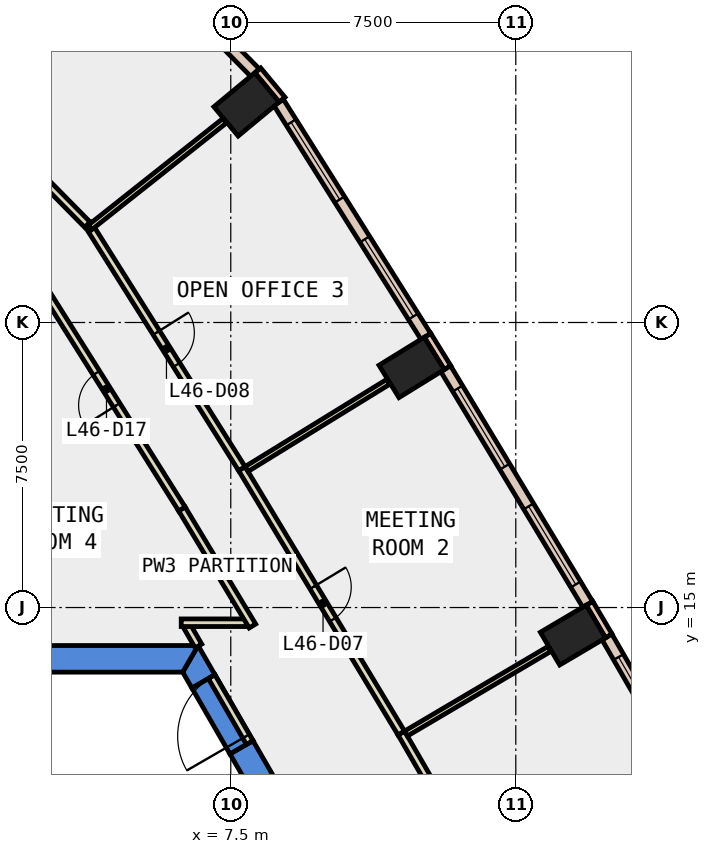
"""IFC4 building model, lengths in metres.
Left out: names, types, materials, properties, quantities, classifications, styles, units other than length and angle.
Written with IfcOpenShell. Run it as: python <this file> out.ifc"""

import sys

from ifc_helpers import new_model, si_unit, direction, frame, frame_2d, origin, origin_2d, place, context, subcontext, project, spatial, polyline, rectangle, outline, extrude, element, fill, save


model = new_model("IFC4")
c1 = context("Model", 3, precision=1e-05, world=origin(), true_north=direction((0.0, 1.0)))
c2 = subcontext(c1, "Body", "Model", "MODEL_VIEW")
j1 = project(units=[si_unit("LENGTHUNIT", "METRE"), si_unit("PLANEANGLEUNIT", "RADIAN")], contexts=[c1])
p1 = place(None, origin())
s1 = spatial("IfcSite", under=j1, at=p1, CompositionType="ELEMENT")
p2 = place(p1, origin())
s2 = spatial("IfcBuilding", under=s1, at=p2, CompositionType="ELEMENT")
p3 = place(p2, frame((0.0, 0.0, 206.6)))
s3 = spatial("IfcBuildingStorey", under=s2, at=p3, CompositionType="ELEMENT", Elevation=206.6)
for number, where, z_axis, x_axis in (
    (1, (16.504, 14.275, -0.4), (0.0, 0.0, 1.0), (-0.509, 0.861, 0.0)),
    (2, (12.259, 21.317, -0.4), (0.0, 0.0, 1.0), (-0.525, 0.851, 0.0)),
    (3, (7.914, 28.238, -0.4), (0.0, 0.0, 1.0), (-0.639, 0.769, 0.0)),
):
    element("IfcColumn", number, at=place(p3, frame(where, z_axis=z_axis, x_axis=x_axis)), inside=s3, PredefinedType="COLUMN", context=c2, shape_type="SweptSolid", body=[
        extrude(rectangle(XDim=1.0, YDim=1.4, at=origin_2d()), origin(), (0.0, 0.0, 1.0), 4.2),
    ])
p4 = place(p3, frame((0.0, 0.0, -0.4)))
e4 = element("IfcWall", 4, at=p4, inside=s3, PredefinedType="SHEAR", context=c2, shape_type="SweptSolid", body=[
    extrude(outline(polyline([(8.084, 11.498), (7.478, 11.148), (12.471, 2.5), (13.279, 2.5), (8.084, 11.498)])), origin(), (0.0, 0.0, 1.0), 4.2),
])
p5 = place(p3, frame((0.0, 0.0, -0.4)))
e5 = element("IfcWall", 5, at=p5, inside=s3, PredefinedType="SHEAR", context=c2, shape_type="SweptSolid", body=[
    extrude(outline(polyline([(6.478, 12.88), (7.084, 13.23), (6.64, 14.0), (6.235, 13.3), (6.478, 12.88)])), origin(), (0.0, 0.0, 1.0), 4.2),
])
p6 = place(p3, frame((0.0, 0.0, 3.6)))
e6 = element("IfcWall", 6, at=p6, inside=s3, PredefinedType="SHEAR", context=c2, shape_type="SweptSolid", body=[
    extrude(outline(polyline([(7.084, 13.23), (6.478, 12.88), (7.478, 11.148), (8.084, 11.498), (7.084, 13.23)])), origin(), (0.0, 0.0, 1.0), 0.2),
])
p7 = place(p3, frame((0.0, 0.0, -0.4)))
e7 = element("IfcWall", 7, at=p7, inside=s3, PredefinedType="SHEAR", context=c2, shape_type="SweptSolid", body=[
    extrude(outline(polyline([(6.64, 14.0), (-6.64, 14.0), (-6.235, 13.3), (6.235, 13.3), (6.64, 14.0)])), origin(), (0.0, 0.0, 1.0), 4.2),
])
p8 = place(p3, frame((17.447, 14.252, 0.0), z_axis=(0.0, 0.0, 1.0), x_axis=(-0.508161541526, 0.861261776531, 0.0)))
e8 = element("IfcWall", 8, at=p8, inside=s3, PredefinedType="STANDARD", context=c2, shape_type="SweptSolid", body=[
    extrude(rectangle(XDim=1.0, YDim=0.2, at=frame_2d((0.5, 0.0))), origin(), (0.0, 0.0, 1.0), 3.8),
])
p9 = place(p3, frame((13.203, 21.312, 0.0), z_axis=(0.0, 0.0, 1.0), x_axis=(-0.525648735675, 0.850701714282, 0.0)))
e9 = element("IfcWall", 9, at=p9, inside=s3, PredefinedType="STANDARD", context=c2, shape_type="SweptSolid", body=[
    extrude(rectangle(XDim=1.0, YDim=0.2, at=frame_2d((0.5, 0.0))), origin(), (0.0, 0.0, 1.0), 3.8),
])
p10 = place(p3, frame((8.849, 28.364, 0.0), z_axis=(0.0, 0.0, 1.0), x_axis=(-0.638117112481, 0.769939316283, 0.0)))
e10 = element("IfcWall", 10, at=p10, inside=s3, PredefinedType="STANDARD", context=c2, shape_type="SweptSolid", body=[
    extrude(rectangle(XDim=1.0, YDim=0.2, at=frame_2d((0.5, 0.0))), origin(), (0.0, 0.0, 1.0), 3.8),
])
p11 = place(p3, frame((21.019, 7.955, 0.0), z_axis=(0.0, 0.0, 1.0), x_axis=(-0.500012402131, 0.866018243292, 0.0)))
e11 = element("IfcWall", 11, at=p11, inside=s3, PredefinedType="STANDARD", context=c2, shape_type="SweptSolid", body=[
    extrude(rectangle(XDim=7.24, YDim=0.3, at=frame_2d((3.62, 0.0))), origin(), (0.0, 0.0, 1.0), 3.8),
])
p12 = place(p11, frame((0.61, 0.0, 0.9)))
e12 = element("IfcOpeningElement", 12, at=p12, cuts=e11, PredefinedType="OPENING", context=c2, shape_type="SweptSolid", body=[
    extrude(rectangle(XDim=2.4, YDim=2.6, at=frame_2d((1.2, 1.3))), frame((0.0, 0.16, 0.0), z_axis=(0.0, -1.0, 0.0), x_axis=(1.0, 0.0, 0.0)), (0.0, 0.0, 1.0), 0.32),
])
p13 = place(p11, frame((4.23, 0.0, 0.9)))
e13 = element("IfcOpeningElement", 13, at=p13, cuts=e11, PredefinedType="OPENING", context=c2, shape_type="SweptSolid", body=[
    extrude(rectangle(XDim=2.4, YDim=2.6, at=frame_2d((1.2, 1.3))), frame((0.0, 0.16, 0.0), z_axis=(0.0, -1.0, 0.0), x_axis=(1.0, 0.0, 0.0)), (0.0, 0.0, 1.0), 0.32),
])
p14 = place(p3, frame((16.892, 15.084, 0.0), z_axis=(0.0, 0.0, 1.0), x_axis=(-0.516230553484, 0.856449657394, 0.0)))
e14 = element("IfcWall", 14, at=p14, inside=s3, PredefinedType="STANDARD", context=c2, shape_type="SweptSolid", body=[
    extrude(rectangle(XDim=7.239, YDim=0.3, at=frame_2d((3.62, 0.0))), origin(), (0.0, 0.0, 1.0), 3.8),
])
p15 = place(p14, frame((0.61, 0.0, 0.9)))
e15 = element("IfcOpeningElement", 15, at=p15, cuts=e14, PredefinedType="OPENING", context=c2, shape_type="SweptSolid", body=[
    extrude(rectangle(XDim=2.4, YDim=2.6, at=frame_2d((1.2, 1.3))), frame((0.0, 0.16, 0.0), z_axis=(0.0, -1.0, 0.0), x_axis=(1.0, 0.0, 0.0)), (0.0, 0.0, 1.0), 0.32),
])
p16 = place(p14, frame((4.229, 0.0, 0.9)))
e16 = element("IfcOpeningElement", 16, at=p16, cuts=e14, PredefinedType="OPENING", context=c2, shape_type="SweptSolid", body=[
    extrude(rectangle(XDim=2.4, YDim=2.6, at=frame_2d((1.2, 1.3))), frame((0.0, 0.16, 0.0), z_axis=(0.0, -1.0, 0.0), x_axis=(1.0, 0.0, 0.0)), (0.0, 0.0, 1.0), 0.32),
])
p17 = place(p3, frame((12.632, 22.134, 0.0), z_axis=(0.0, 0.0, 1.0), x_axis=(-0.532522107002, 0.84641609481, 0.0)))
e17 = element("IfcWall", 17, at=p17, inside=s3, PredefinedType="STANDARD", context=c2, shape_type="SweptSolid", body=[
    extrude(rectangle(XDim=7.273, YDim=0.3, at=frame_2d((3.636, 0.0))), origin(), (0.0, 0.0, 1.0), 3.8),
])
p18 = place(p17, frame((0.618, 0.0, 0.9)))
e18 = element("IfcOpeningElement", 18, at=p18, cuts=e17, PredefinedType="OPENING", context=c2, shape_type="SweptSolid", body=[
    extrude(rectangle(XDim=2.4, YDim=2.6, at=frame_2d((1.2, 1.3))), frame((0.0, 0.16, 0.0), z_axis=(0.0, -1.0, 0.0), x_axis=(1.0, 0.0, 0.0)), (0.0, 0.0, 1.0), 0.32),
])
p19 = place(p17, frame((4.255, 0.0, 0.9)))
e19 = element("IfcOpeningElement", 19, at=p19, cuts=e17, PredefinedType="OPENING", context=c2, shape_type="SweptSolid", body=[
    extrude(rectangle(XDim=2.4, YDim=2.6, at=frame_2d((1.2, 1.3))), frame((0.0, 0.16, 0.0), z_axis=(0.0, -1.0, 0.0), x_axis=(1.0, 0.0, 0.0)), (0.0, 0.0, 1.0), 0.32),
])
p20 = place(p3, frame((8.139, 29.073, 0.0), z_axis=(0.0, 0.0, 1.0), x_axis=(-0.70209072612, 0.712087503258, 0.0)))
e20 = element("IfcWall", 20, at=p20, inside=s3, PredefinedType="STANDARD", context=c2, shape_type="SweptSolid", body=[
    extrude(rectangle(XDim=4.005, YDim=0.3, at=frame_2d((2.002, 0.0))), origin(), (0.0, 0.0, 1.0), 3.8),
])
p21 = place(p20, frame((1.303, 0.0, 0.9)))
e21 = element("IfcOpeningElement", 21, at=p21, cuts=e20, PredefinedType="OPENING", context=c2, shape_type="SweptSolid", body=[
    extrude(rectangle(XDim=1.4, YDim=2.6, at=frame_2d((0.7, 1.3))), frame((0.0, 0.16, 0.0), z_axis=(0.0, -1.0, 0.0), x_axis=(1.0, 0.0, 0.0)), (0.0, 0.0, 1.0), 0.32),
])
p22 = place(p3, frame((6.649, 13.988, 0.0), z_axis=(0.0, 0.0, 1.0), x_axis=(-0.499908430952, 0.866078264744, 0.0)))
e22 = element("IfcWall", 22, at=p22, inside=s3, PredefinedType="PARTITIONING", context=c2, shape_type="SweptSolid", body=[
    extrude(rectangle(XDim=0.606, YDim=0.2, at=frame_2d((0.303, 0.0))), origin(), (0.0, 0.0, 1.0), 3.8),
])
p23 = place(p3, frame((6.196, 14.6, 0.0), z_axis=(0.0, 0.0, 1.0), x_axis=(1.0, 0.0, 0.0)))
e23 = element("IfcWall", 23, at=p23, inside=s3, PredefinedType="PARTITIONING", context=c2, shape_type="SweptSolid", body=[
    extrude(rectangle(XDim=1.722, YDim=0.2, at=frame_2d((0.861, 0.0))), origin(), (0.0, 0.0, 1.0), 3.8),
])
p24 = place(p3, frame((8.07, 14.514, 0.0), z_axis=(0.0, 0.0, 1.0), x_axis=(-0.51624118739, 0.856443247648, 0.0)))
e24 = element("IfcWall", 24, at=p24, inside=s3, PredefinedType="PARTITIONING", context=c2, shape_type="SweptSolid", body=[
    extrude(rectangle(XDim=3.597, YDim=0.2, at=frame_2d((1.799, 0.0))), origin(), (0.0, 0.0, 1.0), 3.8),
])
p25 = place(p3, frame((6.213, 17.595, 0.0), z_axis=(0.0, 0.0, 1.0), x_axis=(-0.532527247309, 0.846412860768, 0.0)))
e25 = element("IfcWall", 25, at=p25, inside=s3, PredefinedType="PARTITIONING", context=c2, shape_type="SweptSolid", body=[
    extrude(rectangle(XDim=7.449, YDim=0.2, at=frame_2d((3.725, 0.0))), origin(), (0.0, 0.0, 1.0), 3.8),
])
p26 = place(p25, frame((3.225, 0.0, 0.0)))
e26 = element("IfcOpeningElement", 26, at=p26, cuts=e25, PredefinedType="OPENING", context=c2, shape_type="SweptSolid", body=[
    extrude(rectangle(XDim=1.0, YDim=2.1, at=frame_2d((0.5, 1.05))), frame((0.0, 0.11, 0.0), z_axis=(0.0, -1.0, 0.0), x_axis=(1.0, 0.0, 0.0)), (0.0, 0.0, 1.0), 0.22),
])
p27 = place(p3, frame((11.987, 11.698, 0.0), z_axis=(0.0, 0.0, 1.0), x_axis=(0.500075329254, -0.865981908051, 0.0)))
e27 = element("IfcWall", 27, at=p27, inside=s3, PredefinedType="PARTITIONING", context=c2, shape_type="SweptSolid", body=[
    extrude(rectangle(XDim=8.125, YDim=0.2, at=frame_2d((4.062, 0.0))), origin(), (0.0, 0.0, 1.0), 3.8),
])
p28 = place(p27, frame((3.637, 0.0, 0.0)))
e28 = element("IfcOpeningElement", 28, at=p28, cuts=e27, PredefinedType="OPENING", context=c2, shape_type="SweptSolid", body=[
    extrude(rectangle(XDim=1.0, YDim=2.1, at=frame_2d((0.5, 1.05))), frame((0.0, 0.11, 0.0), z_axis=(0.0, -1.0, 0.0), x_axis=(1.0, 0.0, 0.0)), (0.0, 0.0, 1.0), 0.22),
])
p29 = place(p3, frame((7.792, 18.655, 0.0), z_axis=(0.0, 0.0, 1.0), x_axis=(0.516293428925, -0.856411755669, 0.0)))
e29 = element("IfcWall", 29, at=p29, inside=s3, PredefinedType="PARTITIONING", context=c2, shape_type="SweptSolid", body=[
    extrude(rectangle(XDim=8.124, YDim=0.2, at=frame_2d((4.062, 0.0))), origin(), (0.0, 0.0, 1.0), 3.8),
])
p30 = place(p29, frame((3.637, 0.0, 0.0)))
e30 = element("IfcOpeningElement", 30, at=p30, cuts=e29, PredefinedType="OPENING", context=c2, shape_type="SweptSolid", body=[
    extrude(rectangle(XDim=1.0, YDim=2.1, at=frame_2d((0.5, 1.05))), frame((0.0, 0.11, 0.0), z_axis=(0.0, -1.0, 0.0), x_axis=(1.0, 0.0, 0.0)), (0.0, 0.0, 1.0), 0.22),
])
p31 = place(p3, frame((3.744, 25.087, 0.0), z_axis=(0.0, 0.0, 1.0), x_axis=(0.532569549341, -0.846386244639, 0.0)))
e31 = element("IfcWall", 31, at=p31, inside=s3, PredefinedType="PARTITIONING", context=c2, shape_type="SweptSolid", body=[
    extrude(rectangle(XDim=7.599, YDim=0.2, at=frame_2d((3.8, 0.0))), origin(), (0.0, 0.0, 1.0), 3.8),
])
p32 = place(p31, frame((3.375, 0.0, 0.0)))
e32 = element("IfcOpeningElement", 32, at=p32, cuts=e31, PredefinedType="OPENING", context=c2, shape_type="SweptSolid", body=[
    extrude(rectangle(XDim=1.0, YDim=2.1, at=frame_2d((0.5, 1.05))), frame((0.0, 0.11, 0.0), z_axis=(0.0, -1.0, 0.0), x_axis=(1.0, 0.0, 0.0)), (0.0, 0.0, 1.0), 0.22),
])
p33 = place(p3, frame((1.773, 27.056, 0.0), z_axis=(0.0, 0.0, 1.0), x_axis=(0.702089218366, -0.712088989842, 0.0)))
e33 = element("IfcWall", 33, at=p33, inside=s3, PredefinedType="PARTITIONING", context=c2, shape_type="SweptSolid", body=[
    extrude(rectangle(XDim=2.783, YDim=0.2, at=frame_2d((1.392, 0.0))), origin(), (0.0, 0.0, 1.0), 3.8),
])
p34 = place(p3, frame((12.111, 11.684, 0.0), z_axis=(0.0, 0.0, 1.0), x_axis=(0.861290233547, 0.508113307833, 0.0)))
e34 = element("IfcWall", 34, at=p34, inside=s3, PredefinedType="PARTITIONING", context=c2, shape_type="SweptSolid", body=[
    extrude(rectangle(XDim=4.381, YDim=0.15, at=frame_2d((2.19, 0.0))), origin(), (0.0, 0.0, 1.0), 3.8),
])
p35 = place(p3, frame((7.916, 18.644, 0.0), z_axis=(0.0, 0.0, 1.0), x_axis=(0.851543444049, 0.524284047914, 0.0)))
e35 = element("IfcWall", 35, at=p35, inside=s3, PredefinedType="PARTITIONING", context=c2, shape_type="SweptSolid", body=[
    extrude(rectangle(XDim=4.379, YDim=0.15, at=frame_2d((2.189, 0.0))), origin(), (0.0, 0.0, 1.0), 3.8),
])
p36 = place(p3, frame((3.797, 25.003, 0.0), z_axis=(0.0, 0.0, 1.0), x_axis=(0.783893371826, 0.620895467536, 0.0)))
e36 = element("IfcWall", 36, at=p36, inside=s3, PredefinedType="PARTITIONING", context=c2, shape_type="SweptSolid", body=[
    extrude(rectangle(XDim=4.514, YDim=0.15, at=frame_2d((2.257, 0.0))), origin(), (0.0, 0.0, 1.0), 3.8),
])
p37 = place(p3, frame((7.997, 11.448, 0.0), z_axis=(0.0, 0.0, 1.0), x_axis=(-0.50002537861, 0.866010750942, 0.0)))
e37 = element("IfcWall", 37, at=p37, inside=s3, PredefinedType="PARTITIONING", context=c2, shape_type="SweptSolid", body=[
    extrude(rectangle(XDim=2.0, YDim=0.2, at=frame_2d((1.0, 0.0))), origin(), (0.0, 0.0, 1.0), 2.4),
])
p38 = place(p37, frame((0.19, 0.0, 0.0)))
e38 = element("IfcOpeningElement", 38, at=p38, cuts=e37, PredefinedType="OPENING", context=c2, shape_type="SweptSolid", body=[
    extrude(rectangle(XDim=1.8, YDim=2.1, at=frame_2d((0.9, 1.05))), frame((0.0, 0.11, 0.0), z_axis=(0.0, -1.0, 0.0), x_axis=(1.0, 0.0, 0.0)), (0.0, 0.0, 1.0), 0.22),
])
p39 = place(p13, origin())
e39 = element("IfcWindow", 39, at=p39, inside=s3, PartitioningType="SINGLE_PANEL", PredefinedType="WINDOW", context=c2, shape_type="SweptSolid", body=[
    extrude(rectangle(XDim=2.4, YDim=2.6, at=frame_2d((1.2, 1.3))), frame((0.0, 0.03, 0.0), z_axis=(0.0, -1.0, 0.0), x_axis=(1.0, 0.0, 0.0)), (0.0, 0.0, 1.0), 0.06),
])
fill(e13, e39)
p40 = place(p15, origin())
e40 = element("IfcWindow", 40, at=p40, inside=s3, PartitioningType="SINGLE_PANEL", PredefinedType="WINDOW", context=c2, shape_type="SweptSolid", body=[
    extrude(rectangle(XDim=2.4, YDim=2.6, at=frame_2d((1.2, 1.3))), frame((0.0, 0.03, 0.0), z_axis=(0.0, -1.0, 0.0), x_axis=(1.0, 0.0, 0.0)), (0.0, 0.0, 1.0), 0.06),
])
fill(e15, e40)
p41 = place(p16, origin())
e41 = element("IfcWindow", 41, at=p41, inside=s3, PartitioningType="SINGLE_PANEL", PredefinedType="WINDOW", context=c2, shape_type="SweptSolid", body=[
    extrude(rectangle(XDim=2.4, YDim=2.6, at=frame_2d((1.2, 1.3))), frame((0.0, 0.03, 0.0), z_axis=(0.0, -1.0, 0.0), x_axis=(1.0, 0.0, 0.0)), (0.0, 0.0, 1.0), 0.06),
])
fill(e16, e41)
p42 = place(p18, origin())
e42 = element("IfcWindow", 42, at=p42, inside=s3, PartitioningType="SINGLE_PANEL", PredefinedType="WINDOW", context=c2, shape_type="SweptSolid", body=[
    extrude(rectangle(XDim=2.4, YDim=2.6, at=frame_2d((1.2, 1.3))), frame((0.0, 0.03, 0.0), z_axis=(0.0, -1.0, 0.0), x_axis=(1.0, 0.0, 0.0)), (0.0, 0.0, 1.0), 0.06),
])
fill(e18, e42)
p43 = place(p19, origin())
e43 = element("IfcWindow", 43, at=p43, inside=s3, PartitioningType="SINGLE_PANEL", PredefinedType="WINDOW", context=c2, shape_type="SweptSolid", body=[
    extrude(rectangle(XDim=2.4, YDim=2.6, at=frame_2d((1.2, 1.3))), frame((0.0, 0.03, 0.0), z_axis=(0.0, -1.0, 0.0), x_axis=(1.0, 0.0, 0.0)), (0.0, 0.0, 1.0), 0.06),
])
fill(e19, e43)
p44 = place(p30, origin())
e44 = element("IfcDoor", 44, at=p44, inside=s3, OperationType="SINGLE_SWING_RIGHT", PredefinedType="DOOR", context=c2, shape_type="SweptSolid", body=[
    extrude(rectangle(XDim=1.0, YDim=2.1, at=frame_2d((0.5, 1.05))), frame((0.0, 0.025, 0.0), z_axis=(0.0, -1.0, 0.0), x_axis=(1.0, 0.0, 0.0)), (0.0, 0.0, 1.0), 0.05),
])
fill(e30, e44)
p45 = place(p32, origin())
e45 = element("IfcDoor", 45, at=p45, inside=s3, OperationType="SINGLE_SWING_LEFT", PredefinedType="DOOR", context=c2, shape_type="SweptSolid", body=[
    extrude(rectangle(XDim=1.0, YDim=2.1, at=frame_2d((0.5, 1.05))), frame((0.0, 0.025, 0.0), z_axis=(0.0, -1.0, 0.0), x_axis=(1.0, 0.0, 0.0)), (0.0, 0.0, 1.0), 0.05),
])
fill(e32, e45)
p46 = place(p26, origin())
e46 = element("IfcDoor", 46, at=p46, inside=s3, OperationType="SINGLE_SWING_LEFT", PredefinedType="DOOR", context=c2, shape_type="SweptSolid", body=[
    extrude(rectangle(XDim=1.0, YDim=2.1, at=frame_2d((0.5, 1.05))), frame((0.0, 0.025, 0.0), z_axis=(0.0, -1.0, 0.0), x_axis=(1.0, 0.0, 0.0)), (0.0, 0.0, 1.0), 0.05),
])
fill(e26, e46)
p47 = place(p38, origin())
e47 = element("IfcDoor", 47, at=p47, inside=s3, OperationType="DOUBLE_DOOR_SINGLE_SWING", PredefinedType="DOOR", context=c2, shape_type="SweptSolid", body=[
    extrude(rectangle(XDim=1.8, YDim=2.1, at=frame_2d((0.9, 1.05))), frame((0.0, 0.025, 0.0), z_axis=(0.0, -1.0, 0.0), x_axis=(1.0, 0.0, 0.0)), (0.0, 0.0, 1.0), 0.05),
])
fill(e38, e47)
save(model, sys.argv[1])
